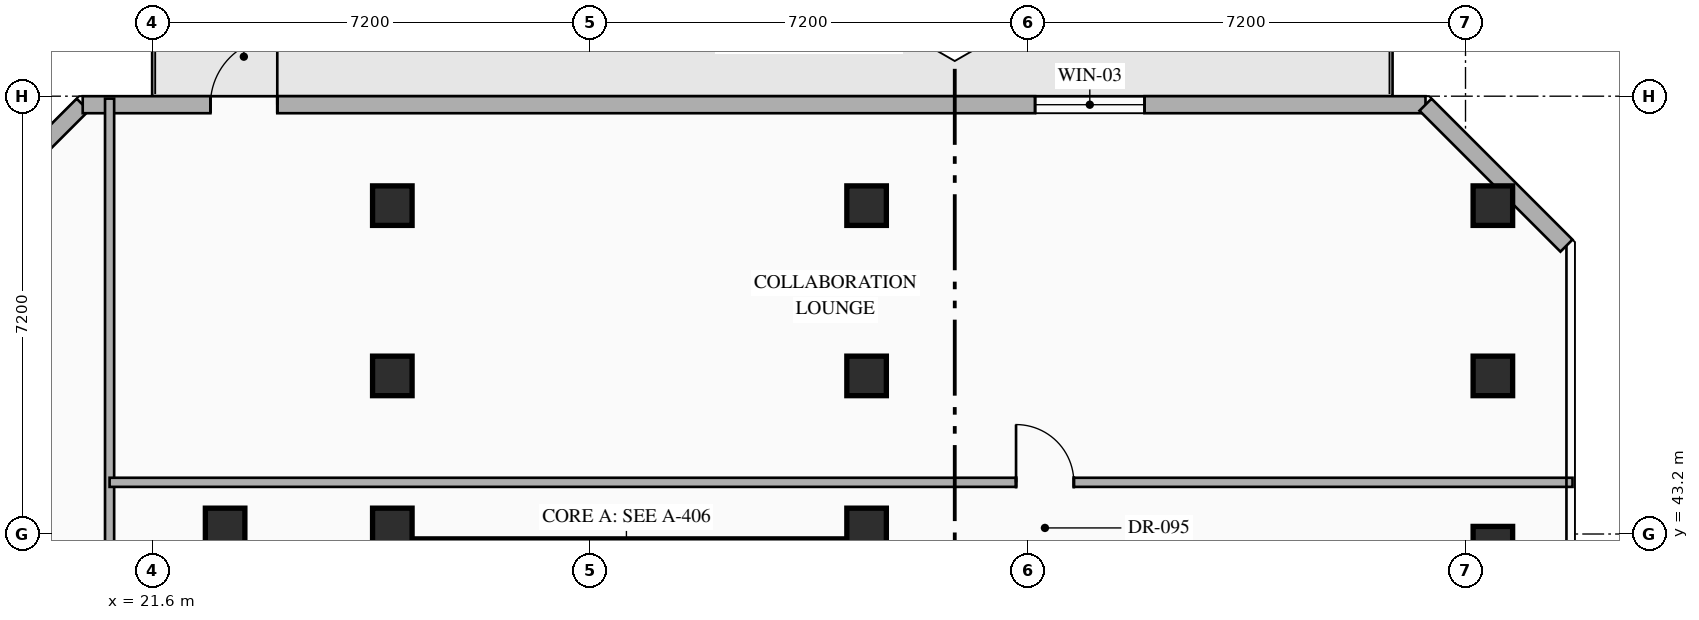
"""IFC4 building model, lengths in metres.
Left out: names, types, materials, properties, quantities, classifications, styles, units other than length and angle.
Written with IfcOpenShell. Run it as: python <this file> out.ifc"""

import sys

from ifc_helpers import new_model, si_unit, direction, frame, frame_2d, origin, origin_2d, place, context, subcontext, project, spatial, rectangle, hollow_rectangle, extrude, element, fill, save


model = new_model("IFC4")
c1 = context("Model", 3, precision=1e-05, world=origin(), true_north=direction((0.0, 1.0)))
c2 = subcontext(c1, "Body", "Model", "MODEL_VIEW")
j1 = project(units=[si_unit("LENGTHUNIT", "METRE"), si_unit("PLANEANGLEUNIT", "RADIAN")], contexts=[c1])
p1 = place(None, origin())
s1 = spatial("IfcSite", under=j1, at=p1, CompositionType="ELEMENT")
p2 = place(p1, origin())
s2 = spatial("IfcBuilding", under=s1, at=p2, CompositionType="ELEMENT")
p3 = place(p2, frame((0.0, 0.0, 239.55)))
s3 = spatial("IfcBuildingStorey", under=s2, at=p3, CompositionType="ELEMENT", Elevation=239.55)
p4 = place(p3, frame((25.77, 42.895, 0.0), z_axis=(0.0, 0.0, 1.0), x_axis=(1.0, 0.0, 0.0)))
e1 = element("IfcWall", 1, at=p4, inside=s3, PredefinedType="SHEAR", context=c2, shape_type="SweptSolid", body=[
    extrude(rectangle(XDim=7.48, YDim=0.45, at=frame_2d((3.74, 0.0))), origin(), (0.0, 0.0, 1.0), 3.6),
])
for number, where, z_axis, x_axis in (
    (2, (25.55, 43.3, 0.0), (0.0, 0.0, 1.0), (1.0, 0.0, 0.0)),
    (3, (33.35, 43.3, 0.0), (0.0, 0.0, 1.0), (1.0, 0.0, 0.0)),
    (4, (43.65, 43.0, 0.0), (0.0, 0.0, 1.0), (1.0, 0.0, 0.0)),
    (5, (25.55, 45.8, 0.0), (0.0, 0.0, 1.0), (1.0, 0.0, 0.0)),
    (6, (33.35, 45.8, 0.0), (0.0, 0.0, 1.0), (1.0, 0.0, 0.0)),
    (7, (43.65, 45.8, 0.0), (0.0, 0.0, 1.0), (1.0, 0.0, 0.0)),
    (8, (25.55, 48.6, 0.0), (0.0, 0.0, 1.0), (1.0, 0.0, 0.0)),
    (9, (33.35, 48.6, 0.0), (0.0, 0.0, 1.0), (1.0, 0.0, 0.0)),
    (10, (43.65, 48.6, 0.0), (0.0, 0.0, 1.0), (1.0, 0.0, 0.0)),
    (11, (22.8, 43.3, 0.0), (0.0, 0.0, 1.0), (1.0, 0.0, 0.0)),
):
    element("IfcColumn", number, at=place(p3, frame(where, z_axis=z_axis, x_axis=x_axis)), inside=s3, PredefinedType="COLUMN", context=c2, shape_type="SweptSolid", body=[
        extrude(hollow_rectangle(XDim=0.65, YDim=0.65, WallThickness=0.025, at=origin_2d()), origin(), (0.0, 0.0, 1.0), 3.6),
    ])
p5 = place(p3, frame((18.14, 47.942, 0.0), z_axis=(0.0, 0.0, 1.0), x_axis=(0.707106781187, 0.707106781187, 0.0)))
e12 = element("IfcWall", 12, at=p5, inside=s3, PredefinedType="STANDARD", context=c2, shape_type="SweptSolid", body=[
    extrude(rectangle(XDim=3.278, YDim=0.28, at=frame_2d((1.639, 0.0))), origin(), (0.0, 0.0, 1.0), 3.35),
])
p6 = place(p3, frame((20.458, 50.26, 0.0), z_axis=(0.0, 0.0, 1.0), x_axis=(1.0, 0.0, 0.0)))
e13 = element("IfcWall", 13, at=p6, inside=s3, PredefinedType="STANDARD", context=c2, shape_type="SweptSolid", body=[
    extrude(rectangle(XDim=22.084, YDim=0.28, at=frame_2d((11.042, 0.0))), origin(), (0.0, 0.0, 1.0), 3.35),
])
p7 = place(p6, frame((2.1, 0.0, 0.0)))
e14 = element("IfcOpeningElement", 14, at=p7, cuts=e13, PredefinedType="OPENING", context=c2, shape_type="SweptSolid", body=[
    extrude(rectangle(XDim=1.1, YDim=2.2, at=frame_2d((0.55, 1.1))), frame((0.0, 0.15, 0.0), z_axis=(0.0, -1.0, 0.0), x_axis=(1.0, 0.0, 0.0)), (0.0, 0.0, 1.0), 0.3),
])
p8 = place(p6, frame((15.663, 0.0, 0.85)))
e15 = element("IfcOpeningElement", 15, at=p8, cuts=e13, PredefinedType="OPENING", context=c2, shape_type="SweptSolid", body=[
    extrude(rectangle(XDim=1.8, YDim=2.1, at=frame_2d((0.9, 1.05))), frame((0.0, 0.15, 0.0), z_axis=(0.0, -1.0, 0.0), x_axis=(1.0, 0.0, 0.0)), (0.0, 0.0, 1.0), 0.3),
])
p9 = place(p3, frame((42.542, 50.26, 0.0), z_axis=(0.0, 0.0, 1.0), x_axis=(0.707106781187, -0.707106781187, 0.0)))
e16 = element("IfcWall", 16, at=p9, inside=s3, PredefinedType="STANDARD", context=c2, shape_type="SweptSolid", body=[
    extrude(rectangle(XDim=3.278, YDim=0.28, at=frame_2d((1.639, 0.0))), origin(), (0.0, 0.0, 1.0), 3.35),
])
p10 = place(p3, frame((20.9, 23.44, 0.0), z_axis=(0.0, 0.0, 1.0), x_axis=(0.0, 1.0, 0.0)))
e17 = element("IfcWall", 17, at=p10, inside=s3, PredefinedType="PARTITIONING", context=c2, shape_type="SweptSolid", body=[
    extrude(rectangle(XDim=26.92, YDim=0.15, at=frame_2d((13.46, 0.0))), origin(), (0.0, 0.0, 1.0), 3.35),
])
p11 = place(p10, frame((7.943, 0.0, 0.0)))
e18 = element("IfcOpeningElement", 18, at=p11, cuts=e17, PredefinedType="OPENING", context=c2, shape_type="SweptSolid", body=[
    extrude(rectangle(XDim=0.95, YDim=2.15, at=frame_2d((0.475, 1.075))), frame((0.0, 0.085, 0.0), z_axis=(0.0, -1.0, 0.0), x_axis=(1.0, 0.0, 0.0)), (0.0, 0.0, 1.0), 0.17),
])
p12 = place(p3, frame((20.9, 44.05, 0.0), z_axis=(0.0, 0.0, 1.0), x_axis=(1.0, 0.0, 0.0)))
e19 = element("IfcWall", 19, at=p12, inside=s3, PredefinedType="PARTITIONING", context=c2, shape_type="SweptSolid", body=[
    extrude(rectangle(XDim=24.06, YDim=0.15, at=frame_2d((12.03, 0.0))), origin(), (0.0, 0.0, 1.0), 3.35),
])
p13 = place(p12, frame((14.908, 0.0, 0.0)))
e20 = element("IfcOpeningElement", 20, at=p13, cuts=e19, PredefinedType="OPENING", context=c2, shape_type="SweptSolid", body=[
    extrude(rectangle(XDim=0.95, YDim=2.15, at=frame_2d((0.475, 1.075))), frame((0.0, 0.085, 0.0), z_axis=(0.0, -1.0, 0.0), x_axis=(1.0, 0.0, 0.0)), (0.0, 0.0, 1.0), 0.17),
])
p14 = place(p7, origin())
e21 = element("IfcDoor", 21, at=p14, inside=s3, OperationType="SINGLE_SWING_RIGHT", PredefinedType="DOOR", context=c2, shape_type="SweptSolid", body=[
    extrude(rectangle(XDim=1.1, YDim=2.2, at=frame_2d((0.55, 1.1))), frame((0.0, 0.025, 0.0), z_axis=(0.0, -1.0, 0.0), x_axis=(1.0, 0.0, 0.0)), (0.0, 0.0, 1.0), 0.05),
])
fill(e14, e21)
p15 = place(p8, origin())
e22 = element("IfcWindow", 22, at=p15, inside=s3, PartitioningType="SINGLE_PANEL", PredefinedType="WINDOW", context=c2, shape_type="SweptSolid", body=[
    extrude(rectangle(XDim=1.8, YDim=2.1, at=frame_2d((0.9, 1.05))), frame((0.0, 0.03, 0.0), z_axis=(0.0, -1.0, 0.0), x_axis=(1.0, 0.0, 0.0)), (0.0, 0.0, 1.0), 0.06),
])
fill(e15, e22)
p16 = place(p13, origin())
e23 = element("IfcDoor", 23, at=p16, inside=s3, OperationType="SINGLE_SWING_LEFT", PredefinedType="DOOR", context=c2, shape_type="SweptSolid", body=[
    extrude(rectangle(XDim=0.95, YDim=2.15, at=frame_2d((0.475, 1.075))), frame((0.0, 0.025, 0.0), z_axis=(0.0, -1.0, 0.0), x_axis=(1.0, 0.0, 0.0)), (0.0, 0.0, 1.0), 0.05),
])
fill(e20, e23)
save(model, sys.argv[1])
